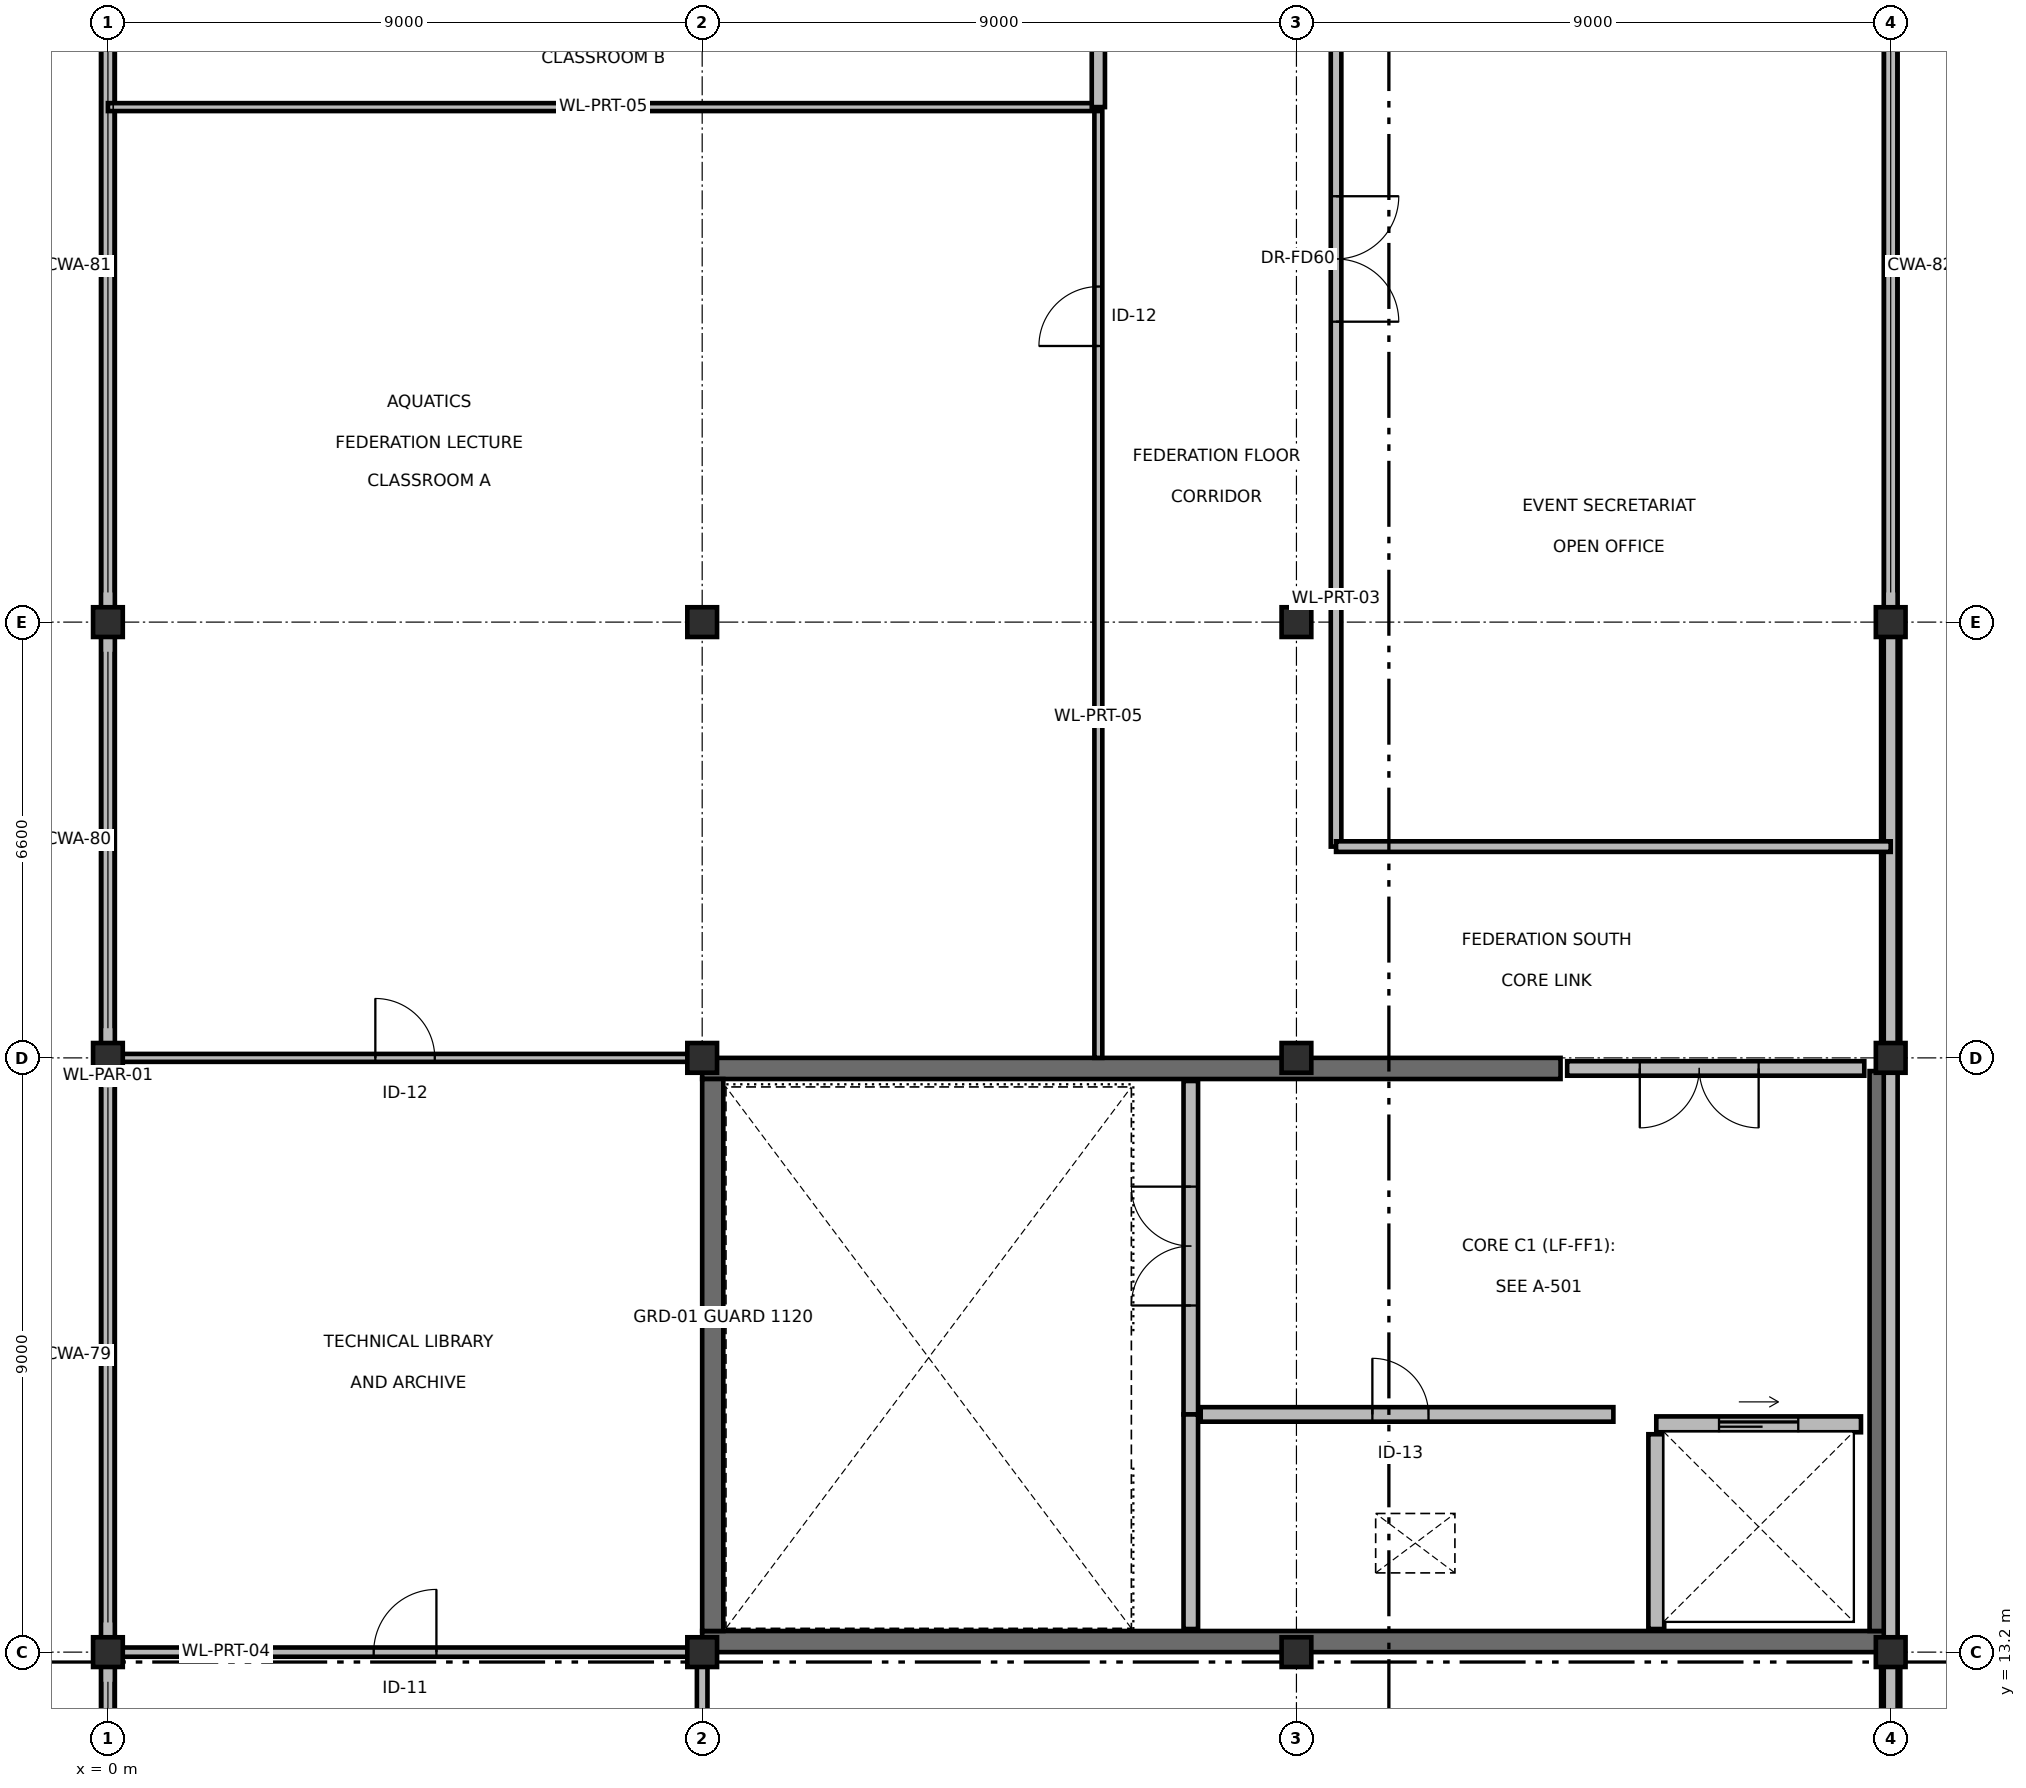
"""IFC4 building model, lengths in metres.
Left out: names, types, materials, properties, quantities, classifications, styles, units other than length and angle.
Written with IfcOpenShell. Run it as: python <this file> out.ifc"""

import sys

from ifc_helpers import new_model, si_unit, direction, frame, frame_2d, origin, origin_2d, place, context, subcontext, project, spatial, rectangle, extrude, element, fill, save


model = new_model("IFC4")
c1 = context("Model", 3, precision=1e-05, world=origin(), true_north=direction((0.0, 1.0)))
c2 = subcontext(c1, "Body", "Model", "MODEL_VIEW")
j1 = project(units=[si_unit("LENGTHUNIT", "METRE"), si_unit("PLANEANGLEUNIT", "RADIAN")], contexts=[c1])
p1 = place(None, origin())
s1 = spatial("IfcSite", under=j1, at=p1, CompositionType="ELEMENT")
p2 = place(p1, origin())
s2 = spatial("IfcBuilding", under=s1, at=p2, CompositionType="ELEMENT")
p3 = place(p2, frame((0.0, 0.0, 18.6)))
s3 = spatial("IfcBuildingStorey", under=s2, at=p3, CompositionType="ELEMENT", Elevation=18.6)
for number, where, z_axis, x_axis in (
    (1, (0.0, 13.2, 0.0), (0.0, 0.0, 1.0), (1.0, 0.0, 0.0)),
    (2, (0.0, 22.2, 0.0), (0.0, 0.0, 1.0), (1.0, 0.0, 0.0)),
    (3, (0.0, 28.8, 0.0), (0.0, 0.0, 1.0), (1.0, 0.0, 0.0)),
    (4, (9.0, 13.2, 0.0), (0.0, 0.0, 1.0), (1.0, 0.0, 0.0)),
    (5, (9.0, 22.2, 0.0), (0.0, 0.0, 1.0), (1.0, 0.0, 0.0)),
    (6, (9.0, 28.8, 0.0), (0.0, 0.0, 1.0), (1.0, 0.0, 0.0)),
    (7, (18.0, 13.2, 0.0), (0.0, 0.0, 1.0), (1.0, 0.0, 0.0)),
    (8, (18.0, 22.2, 0.0), (0.0, 0.0, 1.0), (1.0, 0.0, 0.0)),
    (9, (18.0, 28.8, 0.0), (0.0, 0.0, 1.0), (1.0, 0.0, 0.0)),
    (10, (27.0, 13.2, 0.0), (0.0, 0.0, 1.0), (1.0, 0.0, 0.0)),
    (11, (27.0, 22.2, 0.0), (0.0, 0.0, 1.0), (1.0, 0.0, 0.0)),
    (12, (27.0, 28.8, 0.0), (0.0, 0.0, 1.0), (1.0, 0.0, 0.0)),
):
    element("IfcColumn", number, at=place(p3, frame(where, z_axis=z_axis, x_axis=x_axis)), inside=s3, PredefinedType="COLUMN", context=c2, shape_type="SweptSolid", body=[
        extrude(rectangle(XDim=0.45, YDim=0.45, at=origin_2d()), origin(), (0.0, 0.0, 1.0), 4.2),
    ])
p4 = place(p3, frame((9.0, 13.36, 0.0), z_axis=(0.0, 0.0, 1.0), x_axis=(1.0, 0.0, 0.0)))
e13 = element("IfcWall", 13, at=p4, inside=s3, PredefinedType="SHEAR", context=c2, shape_type="SweptSolid", body=[
    extrude(rectangle(XDim=18.0, YDim=0.32, at=frame_2d((9.0, 0.0))), origin(), (0.0, 0.0, 1.0), 4.2),
])
p5 = place(p3, frame((9.0, 22.04, 0.0), z_axis=(0.0, 0.0, 1.0), x_axis=(1.0, 0.0, 0.0)))
e14 = element("IfcWall", 14, at=p5, inside=s3, PredefinedType="SHEAR", context=c2, shape_type="SweptSolid", body=[
    extrude(rectangle(XDim=13.0, YDim=0.32, at=frame_2d((6.5, 0.0))), origin(), (0.0, 0.0, 1.0), 4.2),
])
p6 = place(p3, frame((9.16, 13.52, 0.0), z_axis=(0.0, 0.0, 1.0), x_axis=(0.0, 1.0, 0.0)))
e15 = element("IfcWall", 15, at=p6, inside=s3, PredefinedType="SHEAR", context=c2, shape_type="SweptSolid", body=[
    extrude(rectangle(XDim=8.36, YDim=0.32, at=frame_2d((4.18, 0.0))), origin(), (0.0, 0.0, 1.0), 4.2),
])
p7 = place(p3, frame((26.84, 13.52, 0.0), z_axis=(0.0, 0.0, 1.0), x_axis=(0.0, 1.0, 0.0)))
e16 = element("IfcWall", 16, at=p7, inside=s3, PredefinedType="SHEAR", context=c2, shape_type="SweptSolid", body=[
    extrude(rectangle(XDim=8.48, YDim=0.32, at=frame_2d((4.24, 0.0))), origin(), (0.0, 0.0, 1.0), 4.2),
])
p8 = place(p3, frame((27.0, 12.97, 0.0), z_axis=(0.0, 0.0, 1.0), x_axis=(0.0, -1.0, 0.0)))
e17 = element("IfcWall", 17, at=p8, inside=s3, PredefinedType="SOLIDWALL", context=c2, shape_type="SweptSolid", body=[
    extrude(rectangle(XDim=8.54, YDim=0.29, at=frame_2d((4.27, 0.0))), origin(), (0.0, 0.0, 1.0), 3.25),
])
p9 = place(p8, frame((2.47, 0.0, 0.95)))
e18 = element("IfcOpeningElement", 18, at=p9, cuts=e17, PredefinedType="OPENING", context=c2, shape_type="SweptSolid", body=[
    extrude(rectangle(XDim=3.6, YDim=0.9, at=frame_2d((1.8, 0.45))), frame((0.0, 0.155, 0.0), z_axis=(0.0, -1.0, 0.0), x_axis=(1.0, 0.0, 0.0)), (0.0, 0.0, 1.0), 0.31),
])
p10 = place(p3, frame((27.0, 28.57, 0.0), z_axis=(0.0, 0.0, 1.0), x_axis=(0.0, -1.0, 0.0)))
e19 = element("IfcWall", 19, at=p10, inside=s3, PredefinedType="SOLIDWALL", context=c2, shape_type="SweptSolid", body=[
    extrude(rectangle(XDim=6.14, YDim=0.29, at=frame_2d((3.07, 0.0))), origin(), (0.0, 0.0, 1.0), 3.25),
])
for number, where, z_axis, x_axis in (
    (20, (27.0, 4.31, 4.2), (0.0, 0.0, 1.0), (0.0, 1.0, 0.0)),
    (21, (0.0, 68.29, 4.2), (0.0, 0.0, 1.0), (0.0, -1.0, 0.0)),
):
    element("IfcWall", number, at=place(p3, frame(where, z_axis=z_axis, x_axis=x_axis)), inside=s3, PredefinedType="PARAPET", context=c2, shape_type="SweptSolid", body=[
        extrude(rectangle(XDim=63.98, YDim=0.21, at=frame_2d((31.99, 0.0))), origin(), (0.0, 0.0, 1.0), 1.15),
    ])
p11 = place(p3, frame((16.4, 21.85, 0.0), z_axis=(0.0, 0.0, 1.0), x_axis=(0.0, -1.0, 0.0)))
e22 = element("IfcWall", 22, at=p11, inside=s3, PredefinedType="PARTITIONING", context=c2, shape_type="SweptSolid", body=[
    extrude(rectangle(XDim=5.05, YDim=0.22, at=frame_2d((2.525, 0.0))), origin(), (0.0, 0.0, 1.0), 3.305),
])
p12 = place(p11, frame((1.6, 0.0, 0.0)))
e23 = element("IfcOpeningElement", 23, at=p12, cuts=e22, PredefinedType="OPENING", context=c2, shape_type="SweptSolid", body=[
    extrude(rectangle(XDim=1.8, YDim=2.2, at=frame_2d((0.9, 1.1))), frame((0.0, 0.12, 0.0), z_axis=(0.0, -1.0, 0.0), x_axis=(1.0, 0.0, 0.0)), (0.0, 0.0, 1.0), 0.24),
])
p13 = place(p3, frame((16.4, 13.55, 0.0), z_axis=(0.0, 0.0, 1.0), x_axis=(0.0, 1.0, 0.0)))
e24 = element("IfcWall", 24, at=p13, inside=s3, PredefinedType="PARTITIONING", context=c2, shape_type="SweptSolid", body=[
    extrude(rectangle(XDim=3.25, YDim=0.22, at=frame_2d((1.625, 0.0))), origin(), (0.0, 0.0, 1.0), 3.305),
])
p14 = place(p3, frame((16.55, 16.8, 0.0), z_axis=(0.0, 0.0, 1.0), x_axis=(1.0, 0.0, 0.0)))
e25 = element("IfcWall", 25, at=p14, inside=s3, PredefinedType="PARTITIONING", context=c2, shape_type="SweptSolid", body=[
    extrude(rectangle(XDim=6.25, YDim=0.22, at=frame_2d((3.125, 0.0))), origin(), (0.0, 0.0, 1.0), 3.355),
])
p15 = place(p14, frame((2.6, 0.0, 0.0)))
e26 = element("IfcOpeningElement", 26, at=p15, cuts=e25, PredefinedType="OPENING", context=c2, shape_type="SweptSolid", body=[
    extrude(rectangle(XDim=0.85, YDim=2.05, at=frame_2d((0.425, 1.025))), frame((0.0, 0.12, 0.0), z_axis=(0.0, -1.0, 0.0), x_axis=(1.0, 0.0, 0.0)), (0.0, 0.0, 1.0), 0.24),
])
p16 = place(p3, frame((23.45, 16.65, 0.0), z_axis=(0.0, 0.0, 1.0), x_axis=(1.0, 0.0, 0.0)))
e27 = element("IfcWall", 27, at=p16, inside=s3, PredefinedType="SOLIDWALL", context=c2, shape_type="SweptSolid", body=[
    extrude(rectangle(XDim=3.1, YDim=0.24, at=frame_2d((1.55, 0.0))), origin(), (0.0, 0.0, 1.0), 3.905),
])
p17 = place(p16, frame((0.95, 0.0, 0.0)))
e28 = element("IfcOpeningElement", 28, at=p17, cuts=e27, PredefinedType="OPENING", context=c2, shape_type="SweptSolid", body=[
    extrude(rectangle(XDim=1.2, YDim=2.2, at=frame_2d((0.6, 1.1))), frame((0.0, 0.13, 0.0), z_axis=(0.0, -1.0, 0.0), x_axis=(1.0, 0.0, 0.0)), (0.0, 0.0, 1.0), 0.26),
])
p18 = place(p3, frame((23.45, 13.55, 0.0), z_axis=(0.0, 0.0, 1.0), x_axis=(0.0, 1.0, 0.0)))
e29 = element("IfcWall", 29, at=p18, inside=s3, PredefinedType="SOLIDWALL", context=c2, shape_type="SweptSolid", body=[
    extrude(rectangle(XDim=2.95, YDim=0.24, at=frame_2d((1.475, 0.0))), origin(), (0.0, 0.0, 1.0), 3.305),
])
p19 = place(p3, frame((22.1, 22.04, 0.0), z_axis=(0.0, 0.0, 1.0), x_axis=(1.0, 0.0, 0.0)))
e30 = element("IfcWall", 30, at=p19, inside=s3, PredefinedType="PARTITIONING", context=c2, shape_type="SweptSolid", body=[
    extrude(rectangle(XDim=4.5, YDim=0.22, at=frame_2d((2.25, 0.0))), origin(), (0.0, 0.0, 1.0), 3.305),
])
p20 = place(p19, frame((1.1, 0.0, 0.0)))
e31 = element("IfcOpeningElement", 31, at=p20, cuts=e30, PredefinedType="OPENING", context=c2, shape_type="SweptSolid", body=[
    extrude(rectangle(XDim=1.8, YDim=2.2, at=frame_2d((0.9, 1.1))), frame((0.0, 0.12, 0.0), z_axis=(0.0, -1.0, 0.0), x_axis=(1.0, 0.0, 0.0)), (0.0, 0.0, 1.0), 0.24),
])
p21 = place(p3, frame((15.0, 22.2, 0.0), z_axis=(0.0, 0.0, 1.0), x_axis=(0.0, 1.0, 0.0)))
e32 = element("IfcWall", 32, at=p21, inside=s3, PredefinedType="PARTITIONING", context=c2, shape_type="SweptSolid", body=[
    extrude(rectangle(XDim=14.4, YDim=0.12, at=frame_2d((7.2, 0.0))), origin(), (0.0, 0.0, 1.0), 3.305),
])
p22 = place(p21, frame((10.782, 0.0, 0.0)))
e33 = element("IfcOpeningElement", 33, at=p22, cuts=e32, PredefinedType="OPENING", context=c2, shape_type="SweptSolid", body=[
    extrude(rectangle(XDim=0.9, YDim=2.1, at=frame_2d((0.45, 1.05))), frame((0.0, 0.07, 0.0), z_axis=(0.0, -1.0, 0.0), x_axis=(1.0, 0.0, 0.0)), (0.0, 0.0, 1.0), 0.14),
])
p23 = place(p3, frame((0.0, 36.6, 0.0), z_axis=(0.0, 0.0, 1.0), x_axis=(1.0, 0.0, 0.0)))
e34 = element("IfcWall", 34, at=p23, inside=s3, PredefinedType="PARTITIONING", context=c2, shape_type="SweptSolid", body=[
    extrude(rectangle(XDim=15.0, YDim=0.12, at=frame_2d((7.5, 0.0))), origin(), (0.0, 0.0, 1.0), 3.205),
])
p24 = place(p3, frame((15.0, 36.6, 0.0), z_axis=(0.0, 0.0, 1.0), x_axis=(0.0, 1.0, 0.0)))
e35 = element("IfcWall", 35, at=p24, inside=s3, PredefinedType="PARTITIONING", context=c2, shape_type="SweptSolid", body=[
    extrude(rectangle(XDim=11.4, YDim=0.2, at=frame_2d((5.7, 0.0))), origin(), (0.0, 0.0, 1.0), 3.305),
])
p25 = place(p24, frame((7.683, 0.0, 0.0)))
e36 = element("IfcOpeningElement", 36, at=p25, cuts=e35, PredefinedType="OPENING", context=c2, shape_type="SweptSolid", body=[
    extrude(rectangle(XDim=1.05, YDim=2.15, at=frame_2d((0.525, 1.075))), frame((0.0, 0.11, 0.0), z_axis=(0.0, -1.0, 0.0), x_axis=(1.0, 0.0, 0.0)), (0.0, 0.0, 1.0), 0.22),
])
p26 = place(p3, frame((9.0, 4.2, 0.0), z_axis=(0.0, 0.0, 1.0), x_axis=(0.0, 1.0, 0.0)))
e37 = element("IfcWall", 37, at=p26, inside=s3, PredefinedType="PARTITIONING", context=c2, shape_type="SweptSolid", body=[
    extrude(rectangle(XDim=9.0, YDim=0.16, at=frame_2d((4.5, 0.0))), origin(), (0.0, 0.0, 1.0), 3.255),
])
p27 = place(p26, frame((4.0, 0.0, 0.0)))
e38 = element("IfcOpeningElement", 38, at=p27, cuts=e37, PredefinedType="OPENING", context=c2, shape_type="SweptSolid", body=[
    extrude(rectangle(XDim=1.0, YDim=2.1, at=frame_2d((0.5, 1.05))), frame((0.0, 0.09, 0.0), z_axis=(0.0, -1.0, 0.0), x_axis=(1.0, 0.0, 0.0)), (0.0, 0.0, 1.0), 0.18),
])
p28 = place(p3, frame((0.0, 13.2, 0.0), z_axis=(0.0, 0.0, 1.0), x_axis=(1.0, 0.0, 0.0)))
e39 = element("IfcWall", 39, at=p28, inside=s3, PredefinedType="PARTITIONING", context=c2, shape_type="SweptSolid", body=[
    extrude(rectangle(XDim=9.0, YDim=0.14, at=frame_2d((4.5, 0.0))), origin(), (0.0, 0.0, 1.0), 3.255),
])
p29 = place(p28, frame((4.025, 0.0, 0.0)))
e40 = element("IfcOpeningElement", 40, at=p29, cuts=e39, PredefinedType="OPENING", context=c2, shape_type="SweptSolid", body=[
    extrude(rectangle(XDim=0.95, YDim=2.1, at=frame_2d((0.475, 1.05))), frame((0.0, 0.08, 0.0), z_axis=(0.0, -1.0, 0.0), x_axis=(1.0, 0.0, 0.0)), (0.0, 0.0, 1.0), 0.16),
])
p30 = place(p3, frame((0.0, 22.2, 0.0), z_axis=(0.0, 0.0, 1.0), x_axis=(1.0, 0.0, 0.0)))
e41 = element("IfcWall", 41, at=p30, inside=s3, PredefinedType="PARTITIONING", context=c2, shape_type="SweptSolid", body=[
    extrude(rectangle(XDim=9.0, YDim=0.12, at=frame_2d((4.5, 0.0))), origin(), (0.0, 0.0, 1.0), 3.255),
])
p31 = place(p30, frame((4.05, 0.0, 0.0)))
e42 = element("IfcOpeningElement", 42, at=p31, cuts=e41, PredefinedType="OPENING", context=c2, shape_type="SweptSolid", body=[
    extrude(rectangle(XDim=0.9, YDim=2.1, at=frame_2d((0.45, 1.05))), frame((0.0, 0.07, 0.0), z_axis=(0.0, -1.0, 0.0), x_axis=(1.0, 0.0, 0.0)), (0.0, 0.0, 1.0), 0.14),
])
p32 = place(p3, frame((18.6, 25.4, 0.0), z_axis=(0.0, 0.0, 1.0), x_axis=(0.0, 1.0, 0.0)))
e43 = element("IfcWall", 43, at=p32, inside=s3, PredefinedType="PARTITIONING", context=c2, shape_type="SweptSolid", body=[
    extrude(rectangle(XDim=17.8, YDim=0.16, at=frame_2d((8.9, 0.0))), origin(), (0.0, 0.0, 1.0), 3.305),
])
p33 = place(p32, frame((7.95, 0.0, 0.0)))
e44 = element("IfcOpeningElement", 44, at=p33, cuts=e43, PredefinedType="OPENING", context=c2, shape_type="SweptSolid", body=[
    extrude(rectangle(XDim=1.9, YDim=2.2, at=frame_2d((0.95, 1.1))), frame((0.0, 0.09, 0.0), z_axis=(0.0, -1.0, 0.0), x_axis=(1.0, 0.0, 0.0)), (0.0, 0.0, 1.0), 0.18),
])
p34 = place(p3, frame((18.6, 25.4, 0.0), z_axis=(0.0, 0.0, 1.0), x_axis=(1.0, 0.0, 0.0)))
e45 = element("IfcWall", 45, at=p34, inside=s3, PredefinedType="PARTITIONING", context=c2, shape_type="SweptSolid", body=[
    extrude(rectangle(XDim=8.4, YDim=0.16, at=frame_2d((4.2, 0.0))), origin(), (0.0, 0.0, 1.0), 3.255),
])
p35 = place(p12, origin())
e46 = element("IfcDoor", 46, at=p35, inside=s3, OperationType="DOUBLE_DOOR_SINGLE_SWING", PredefinedType="DOOR", context=c2, shape_type="SweptSolid", body=[
    extrude(rectangle(XDim=1.8, YDim=2.2, at=frame_2d((0.9, 1.1))), frame((0.0, 0.025, 0.0), z_axis=(0.0, -1.0, 0.0), x_axis=(1.0, 0.0, 0.0)), (0.0, 0.0, 1.0), 0.05),
])
fill(e23, e46)
p36 = place(p15, origin())
e47 = element("IfcDoor", 47, at=p36, inside=s3, OperationType="SINGLE_SWING_LEFT", PredefinedType="DOOR", context=c2, shape_type="SweptSolid", body=[
    extrude(rectangle(XDim=0.85, YDim=2.05, at=frame_2d((0.425, 1.025))), frame((0.0, 0.025, 0.0), z_axis=(0.0, -1.0, 0.0), x_axis=(1.0, 0.0, 0.0)), (0.0, 0.0, 1.0), 0.05),
])
fill(e26, e47)
p37 = place(p17, origin())
e48 = element("IfcDoor", 48, at=p37, inside=s3, OperationType="DOUBLE_DOOR_SLIDING", PredefinedType="DOOR", context=c2, shape_type="SweptSolid", body=[
    extrude(rectangle(XDim=1.2, YDim=2.2, at=frame_2d((0.6, 1.1))), frame((0.0, 0.025, 0.0), z_axis=(0.0, -1.0, 0.0), x_axis=(1.0, 0.0, 0.0)), (0.0, 0.0, 1.0), 0.05),
])
fill(e28, e48)
p38 = place(p20, origin())
e49 = element("IfcDoor", 49, at=p38, inside=s3, OperationType="DOUBLE_DOOR_SINGLE_SWING", PredefinedType="DOOR", context=c2, shape_type="SweptSolid", body=[
    extrude(rectangle(XDim=1.8, YDim=2.2, at=frame_2d((0.9, 1.1))), frame((0.0, 0.025, 0.0), z_axis=(0.0, -1.0, 0.0), x_axis=(1.0, 0.0, 0.0)), (0.0, 0.0, 1.0), 0.05),
])
fill(e31, e49)
p39 = place(p22, origin())
e50 = element("IfcDoor", 50, at=p39, inside=s3, OperationType="SINGLE_SWING_LEFT", PredefinedType="DOOR", context=c2, shape_type="SweptSolid", body=[
    extrude(rectangle(XDim=0.9, YDim=2.1, at=frame_2d((0.45, 1.05))), frame((0.0, 0.025, 0.0), z_axis=(0.0, -1.0, 0.0), x_axis=(1.0, 0.0, 0.0)), (0.0, 0.0, 1.0), 0.05),
])
fill(e33, e50)
p40 = place(p29, origin())
e51 = element("IfcDoor", 51, at=p40, inside=s3, OperationType="SINGLE_SWING_RIGHT", PredefinedType="DOOR", context=c2, shape_type="SweptSolid", body=[
    extrude(rectangle(XDim=0.95, YDim=2.1, at=frame_2d((0.475, 1.05))), frame((0.0, 0.025, 0.0), z_axis=(0.0, -1.0, 0.0), x_axis=(1.0, 0.0, 0.0)), (0.0, 0.0, 1.0), 0.05),
])
fill(e40, e51)
p41 = place(p31, origin())
e52 = element("IfcDoor", 52, at=p41, inside=s3, OperationType="SINGLE_SWING_LEFT", PredefinedType="DOOR", context=c2, shape_type="SweptSolid", body=[
    extrude(rectangle(XDim=0.9, YDim=2.1, at=frame_2d((0.45, 1.05))), frame((0.0, 0.025, 0.0), z_axis=(0.0, -1.0, 0.0), x_axis=(1.0, 0.0, 0.0)), (0.0, 0.0, 1.0), 0.05),
])
fill(e42, e52)
p42 = place(p33, origin())
e53 = element("IfcDoor", 53, at=p42, inside=s3, OperationType="DOUBLE_DOOR_SINGLE_SWING", PredefinedType="DOOR", context=c2, shape_type="SweptSolid", body=[
    extrude(rectangle(XDim=1.9, YDim=2.2, at=frame_2d((0.95, 1.1))), frame((0.0, 0.025, 0.0), z_axis=(0.0, -1.0, 0.0), x_axis=(1.0, 0.0, 0.0)), (0.0, 0.0, 1.0), 0.05),
])
fill(e44, e53)
save(model, sys.argv[1])
